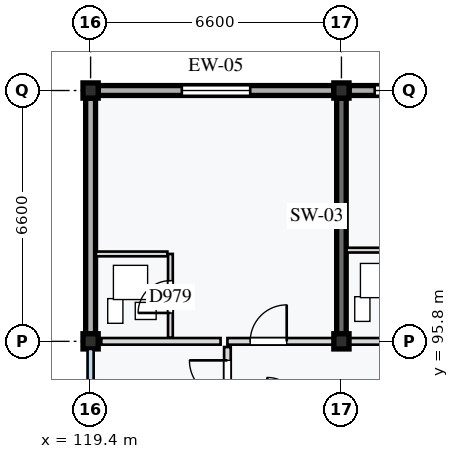
"""IFC4 building model, lengths in metres.
Left out: names, types, materials, properties, quantities, classifications, styles, units other than length and angle.
Written with IfcOpenShell. Run it as: python <this file> out.ifc"""

import sys

from ifc_helpers import new_model, si_unit, direction, frame, frame_2d, origin, origin_2d, place, context, subcontext, project, spatial, rectangle, extrude, element, fill, save


model = new_model("IFC4")
c1 = context("Model", 3, precision=1e-05, world=origin(), true_north=direction((0.0, 1.0)))
c2 = subcontext(c1, "Body", "Model", "MODEL_VIEW")
j1 = project(units=[si_unit("LENGTHUNIT", "METRE"), si_unit("PLANEANGLEUNIT", "RADIAN")], contexts=[c1])
p1 = place(None, origin())
s1 = spatial("IfcSite", under=j1, at=p1, CompositionType="ELEMENT")
p2 = place(p1, origin())
s2 = spatial("IfcBuilding", under=s1, at=p2, CompositionType="ELEMENT")
p3 = place(p2, frame((0.0, 0.0, 40.4)))
s3 = spatial("IfcBuildingStorey", under=s2, at=p3, CompositionType="ELEMENT", Elevation=40.4)
for number, where, z_axis, x_axis in (
    (1, (119.4, 95.8, 0.0), (0.0, 0.0, 1.0), (1.0, 0.0, 0.0)),
    (2, (119.4, 102.4, 0.0), (0.0, 0.0, 1.0), (1.0, 0.0, 0.0)),
    (3, (126.0, 95.8, 0.0), (0.0, 0.0, 1.0), (1.0, 0.0, 0.0)),
    (4, (126.0, 102.4, 0.0), (0.0, 0.0, 1.0), (1.0, 0.0, 0.0)),
):
    element("IfcColumn", number, at=place(p3, frame(where, z_axis=z_axis, x_axis=x_axis)), inside=s3, PredefinedType="COLUMN", context=c2, shape_type="SweptSolid", body=[
        extrude(rectangle(XDim=0.4, YDim=0.4, at=origin_2d()), origin(), (0.0, 0.0, 1.0), 3.2),
    ])
p4 = place(p3, frame((126.0, 96.0, 0.0), z_axis=(0.0, 0.0, 1.0), x_axis=(0.0, 1.0, 0.0)))
e5 = element("IfcWall", 5, at=p4, inside=s3, PredefinedType="SHEAR", context=c2, shape_type="SweptSolid", body=[
    extrude(rectangle(XDim=6.2, YDim=0.25, at=frame_2d((3.1, 0.0))), origin(), (0.0, 0.0, 1.0), 2.98),
])
p5 = place(p3, frame((119.6, 102.4, 0.0), z_axis=(0.0, 0.0, 1.0), x_axis=(1.0, 0.0, 0.0)))
e6 = element("IfcWall", 6, at=p5, inside=s3, PredefinedType="STANDARD", context=c2, shape_type="SweptSolid", body=[
    extrude(rectangle(XDim=6.2, YDim=0.26, at=frame_2d((3.1, 0.0))), origin(), (0.0, 0.0, 1.0), 2.6),
])
p6 = place(p5, frame((2.2, 0.0, 0.85)))
e7 = element("IfcOpeningElement", 7, at=p6, cuts=e6, PredefinedType="OPENING", context=c2, shape_type="SweptSolid", body=[
    extrude(rectangle(XDim=1.8, YDim=1.35, at=frame_2d((0.9, 0.675))), frame((0.0, 0.14, 0.0), z_axis=(0.0, -1.0, 0.0), x_axis=(1.0, 0.0, 0.0)), (0.0, 0.0, 1.0), 0.28),
])
p7 = place(p3, frame((126.2, 102.4, 0.0), z_axis=(0.0, 0.0, 1.0), x_axis=(1.0, 0.0, 0.0)))
e8 = element("IfcWall", 8, at=p7, inside=s3, PredefinedType="STANDARD", context=c2, shape_type="SweptSolid", body=[
    extrude(rectangle(XDim=6.2, YDim=0.26, at=frame_2d((3.1, 0.0))), origin(), (0.0, 0.0, 1.0), 2.6),
])
p8 = place(p7, frame((0.675, 0.0, 0.85)))
e9 = element("IfcOpeningElement", 9, at=p8, cuts=e8, PredefinedType="OPENING", context=c2, shape_type="SweptSolid", body=[
    extrude(rectangle(XDim=1.8, YDim=1.35, at=frame_2d((0.9, 0.675))), frame((0.0, 0.14, 0.0), z_axis=(0.0, -1.0, 0.0), x_axis=(1.0, 0.0, 0.0)), (0.0, 0.0, 1.0), 0.28),
])
p9 = place(p7, frame((4.1, 0.0, 0.85)))
e10 = element("IfcOpeningElement", 10, at=p9, cuts=e8, PredefinedType="OPENING", context=c2, shape_type="SweptSolid", body=[
    extrude(rectangle(XDim=1.5, YDim=1.35, at=frame_2d((0.75, 0.675))), frame((0.0, 0.14, 0.0), z_axis=(0.0, -1.0, 0.0), x_axis=(1.0, 0.0, 0.0)), (0.0, 0.0, 1.0), 0.28),
])
p10 = place(p3, frame((119.4, 96.0, 0.0), z_axis=(0.0, 0.0, 1.0), x_axis=(0.0, 1.0, 0.0)))
e11 = element("IfcWall", 11, at=p10, inside=s3, PredefinedType="STANDARD", context=c2, shape_type="SweptSolid", body=[
    extrude(rectangle(XDim=6.2, YDim=0.26, at=frame_2d((3.1, 0.0))), origin(), (0.0, 0.0, 1.0), 2.65),
])
p11 = place(p3, frame((123.0, 92.65, 0.0), z_axis=(0.0, 0.0, 1.0), x_axis=(0.0, 1.0, 0.0)))
e12 = element("IfcWall", 12, at=p11, inside=s3, PredefinedType="PARTITIONING", context=c2, shape_type="SweptSolid", body=[
    extrude(rectangle(XDim=3.0, YDim=0.175, at=frame_2d((1.5, 0.0))), origin(), (0.0, 0.0, 1.0), 2.945),
])
p12 = place(p11, frame((1.65, 0.0, 0.0)))
e13 = element("IfcOpeningElement", 13, at=p12, cuts=e12, PredefinedType="OPENING", context=c2, shape_type="SweptSolid", body=[
    extrude(rectangle(XDim=1.0, YDim=2.16, at=frame_2d((0.5, 1.08))), frame((0.0, 0.097, 0.0), z_axis=(0.0, -1.0, 0.0), x_axis=(1.0, 0.0, 0.0)), (0.0, 0.0, 1.0), 0.195),
])
p13 = place(p3, frame((119.68, 95.8, 0.0), z_axis=(0.0, 0.0, 1.0), x_axis=(1.0, 0.0, 0.0)))
e14 = element("IfcWall", 14, at=p13, inside=s3, PredefinedType="PARTITIONING", context=c2, shape_type="SweptSolid", body=[
    extrude(rectangle(XDim=3.14, YDim=0.175, at=frame_2d((1.57, 0.0))), origin(), (0.0, 0.0, 1.0), 2.55),
])
p14 = place(p3, frame((123.0, 95.8, 0.0), z_axis=(0.0, 0.0, 1.0), x_axis=(1.0, 0.0, 0.0)))
e15 = element("IfcWall", 15, at=p14, inside=s3, PredefinedType="PARTITIONING", context=c2, shape_type="SweptSolid", body=[
    extrude(rectangle(XDim=3.0, YDim=0.175, at=frame_2d((1.5, 0.0))), origin(), (0.0, 0.0, 1.0), 2.55),
])
p15 = place(p14, frame((0.6, 0.0, 0.0)))
e16 = element("IfcOpeningElement", 16, at=p15, cuts=e15, PredefinedType="OPENING", context=c2, shape_type="SweptSolid", body=[
    extrude(rectangle(XDim=0.96, YDim=2.18, at=frame_2d((0.48, 1.09))), frame((0.0, 0.097, 0.0), z_axis=(0.0, -1.0, 0.0), x_axis=(1.0, 0.0, 0.0)), (0.0, 0.0, 1.0), 0.195),
])
p16 = place(p3, frame((121.5, 95.897, 0.0), z_axis=(0.0, 0.0, 1.0), x_axis=(0.0, 1.0, 0.0)))
e17 = element("IfcWall", 17, at=p16, inside=s3, PredefinedType="PARTITIONING", context=c2, shape_type="SweptSolid", body=[
    extrude(rectangle(XDim=2.203, YDim=0.125, at=frame_2d((1.101, 0.0))), origin(), (0.0, 0.0, 1.0), 2.945),
])
p17 = place(p16, frame((0.65, 0.0, 0.0)))
e18 = element("IfcOpeningElement", 18, at=p17, cuts=e17, PredefinedType="OPENING", context=c2, shape_type="SweptSolid", body=[
    extrude(rectangle(XDim=0.85, YDim=2.04, at=frame_2d((0.425, 1.02))), frame((0.0, 0.073, 0.0), z_axis=(0.0, -1.0, 0.0), x_axis=(1.0, 0.0, 0.0)), (0.0, 0.0, 1.0), 0.145),
])
p18 = place(p3, frame((119.54, 98.1, 0.0), z_axis=(0.0, 0.0, 1.0), x_axis=(1.0, 0.0, 0.0)))
e19 = element("IfcWall", 19, at=p18, inside=s3, PredefinedType="PARTITIONING", context=c2, shape_type="SweptSolid", body=[
    extrude(rectangle(XDim=1.88, YDim=0.125, at=frame_2d((0.94, 0.0))), origin(), (0.0, 0.0, 1.0), 2.945),
])
p19 = place(p3, frame((126.0, 95.8, 0.0), z_axis=(0.0, 0.0, 1.0), x_axis=(1.0, 0.0, 0.0)))
e20 = element("IfcWall", 20, at=p19, inside=s3, PredefinedType="PARTITIONING", context=c2, shape_type="SweptSolid", body=[
    extrude(rectangle(XDim=6.6, YDim=0.175, at=frame_2d((3.3, 0.0))), origin(), (0.0, 0.0, 1.0), 2.55),
])
p20 = place(p19, frame((3.85, 0.0, 0.0)))
e21 = element("IfcOpeningElement", 21, at=p20, cuts=e20, PredefinedType="OPENING", context=c2, shape_type="SweptSolid", body=[
    extrude(rectangle(XDim=0.95, YDim=2.16, at=frame_2d((0.475, 1.08))), frame((0.0, 0.097, 0.0), z_axis=(0.0, -1.0, 0.0), x_axis=(1.0, 0.0, 0.0)), (0.0, 0.0, 1.0), 0.195),
])
p21 = place(p3, frame((126.135, 98.2, 0.0), z_axis=(0.0, 0.0, 1.0), x_axis=(1.0, 0.0, 0.0)))
e22 = element("IfcWall", 22, at=p21, inside=s3, PredefinedType="PARTITIONING", context=c2, shape_type="SweptSolid", body=[
    extrude(rectangle(XDim=1.685, YDim=0.125, at=frame_2d((0.843, 0.0))), origin(), (0.0, 0.0, 1.0), 2.945),
])
p22 = place(p6, origin())
e23 = element("IfcWindow", 23, at=p22, inside=s3, PartitioningType="SINGLE_PANEL", PredefinedType="WINDOW", context=c2, shape_type="SweptSolid", body=[
    extrude(rectangle(XDim=1.8, YDim=1.35, at=frame_2d((0.9, 0.675))), frame((0.0, 0.03, 0.0), z_axis=(0.0, -1.0, 0.0), x_axis=(1.0, 0.0, 0.0)), (0.0, 0.0, 1.0), 0.06),
])
fill(e7, e23)
p23 = place(p8, origin())
e24 = element("IfcWindow", 24, at=p23, inside=s3, PartitioningType="SINGLE_PANEL", PredefinedType="WINDOW", context=c2, shape_type="SweptSolid", body=[
    extrude(rectangle(XDim=1.8, YDim=1.35, at=frame_2d((0.9, 0.675))), frame((0.0, 0.03, 0.0), z_axis=(0.0, -1.0, 0.0), x_axis=(1.0, 0.0, 0.0)), (0.0, 0.0, 1.0), 0.06),
])
fill(e9, e24)
p24 = place(p12, origin())
e25 = element("IfcDoor", 25, at=p24, inside=s3, OperationType="SINGLE_SWING_RIGHT", PredefinedType="DOOR", context=c2, shape_type="SweptSolid", body=[
    extrude(rectangle(XDim=1.0, YDim=2.16, at=frame_2d((0.5, 1.08))), frame((0.0, 0.025, 0.0), z_axis=(0.0, -1.0, 0.0), x_axis=(1.0, 0.0, 0.0)), (0.0, 0.0, 1.0), 0.05),
])
fill(e13, e25)
p25 = place(p15, origin())
e26 = element("IfcDoor", 26, at=p25, inside=s3, OperationType="SINGLE_SWING_RIGHT", PredefinedType="DOOR", context=c2, shape_type="SweptSolid", body=[
    extrude(rectangle(XDim=0.96, YDim=2.18, at=frame_2d((0.48, 1.09))), frame((0.0, 0.025, 0.0), z_axis=(0.0, -1.0, 0.0), x_axis=(1.0, 0.0, 0.0)), (0.0, 0.0, 1.0), 0.05),
])
fill(e16, e26)
p26 = place(p17, origin())
e27 = element("IfcDoor", 27, at=p26, inside=s3, OperationType="SINGLE_SWING_LEFT", PredefinedType="DOOR", context=c2, shape_type="SweptSolid", body=[
    extrude(rectangle(XDim=0.85, YDim=2.04, at=frame_2d((0.425, 1.02))), frame((0.0, 0.025, 0.0), z_axis=(0.0, -1.0, 0.0), x_axis=(1.0, 0.0, 0.0)), (0.0, 0.0, 1.0), 0.05),
])
fill(e18, e27)
save(model, sys.argv[1])
